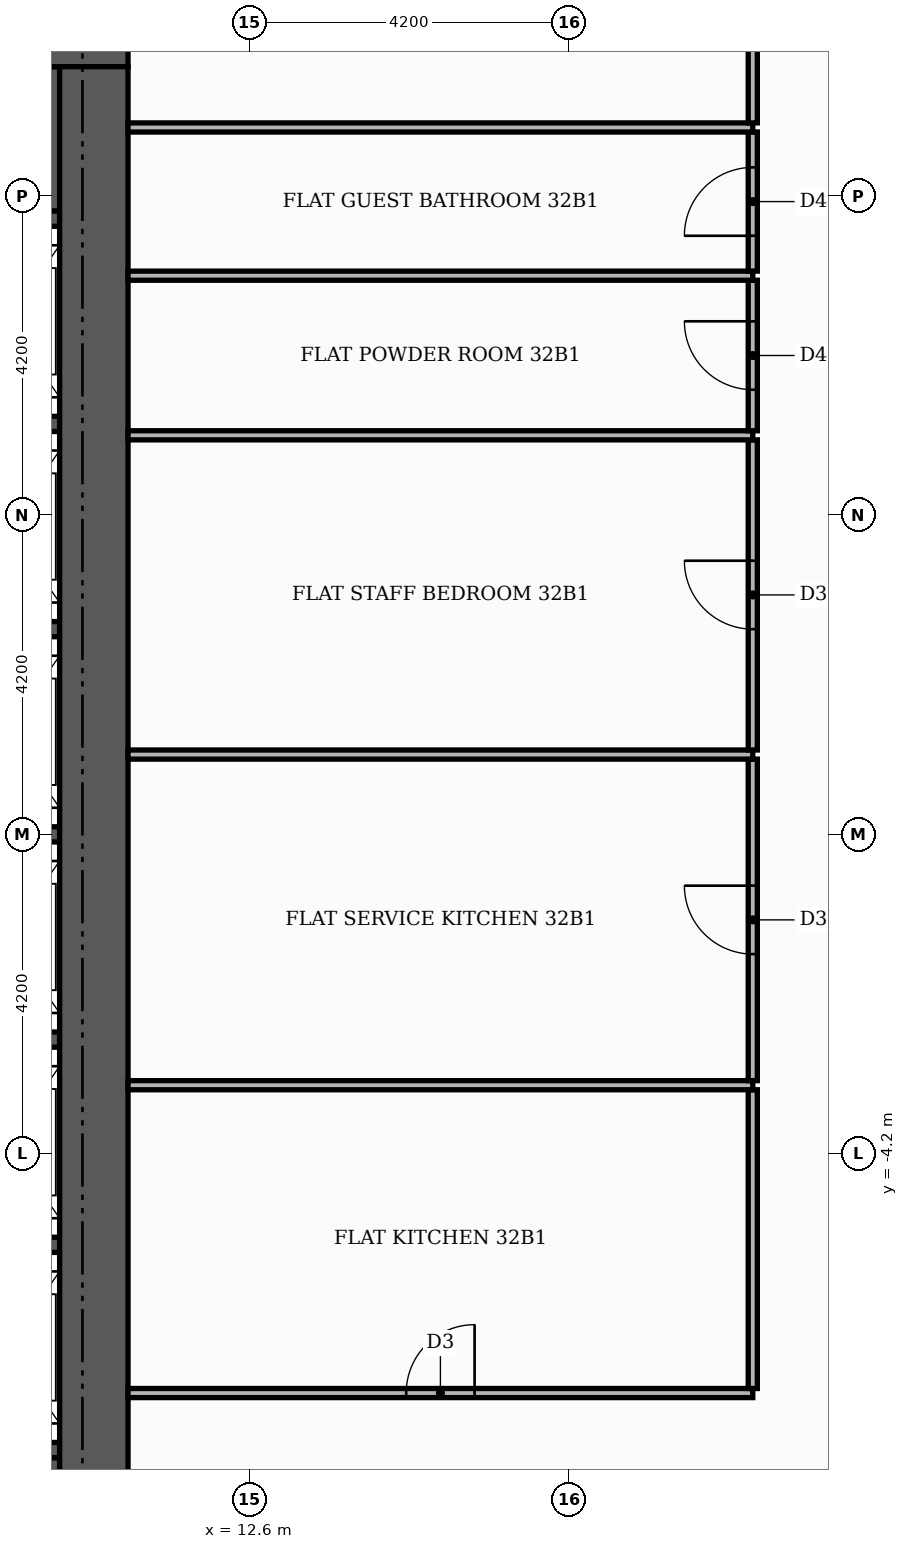
"""IFC4 building model, lengths in metres.
Left out: names, types, materials, properties, quantities, classifications, styles, units other than length and angle.
Written with IfcOpenShell. Run it as: python <this file> out.ifc"""

import sys

from ifc_helpers import new_model, si_unit, direction, frame, frame_2d, origin, place, context, subcontext, project, spatial, rectangle, extrude, element, fill, save


model = new_model("IFC4")
c1 = context("Model", 3, precision=1e-05, world=origin(), true_north=direction((0.0, 1.0)))
c2 = subcontext(c1, "Body", "Model", "MODEL_VIEW")
j1 = project(units=[si_unit("LENGTHUNIT", "METRE"), si_unit("PLANEANGLEUNIT", "RADIAN")], contexts=[c1])
p1 = place(None, origin())
s1 = spatial("IfcSite", under=j1, at=p1, CompositionType="ELEMENT")
p2 = place(p1, origin())
s2 = spatial("IfcBuilding", under=s1, at=p2, CompositionType="ELEMENT")
p3 = place(p2, frame((0.0, 0.0, 137.7)))
s3 = spatial("IfcBuildingStorey", under=s2, at=p3, CompositionType="ELEMENT", Elevation=137.7)
for number, where, z_axis, x_axis in (
    (1, (5.5, -9.15, 0.0), (0.0, 0.0, 1.0), (1.0, 0.0, 0.0)),
    (2, (5.5, 9.15, 0.0), (0.0, 0.0, 1.0), (1.0, 0.0, 0.0)),
):
    element("IfcWall", number, at=place(p3, frame(where, z_axis=z_axis, x_axis=x_axis)), inside=s3, PredefinedType="SHEAR", context=c2, shape_type="SweptSolid", body=[
        extrude(rectangle(XDim=4.6, YDim=1.9, at=frame_2d((2.3, 0.0))), origin(), (0.0, 0.0, 1.0), 3.48),
    ])
for number, where, z_axis, x_axis in (
    (3, (8.1, -8.1, 0.0), (0.0, 0.0, 1.0), (1.0, 0.0, 0.0)),
    (4, (8.1, -5.4, 0.0), (0.0, 0.0, 1.0), (1.0, 0.0, 0.0)),
    (5, (8.1, -2.7, 0.0), (0.0, 0.0, 1.0), (1.0, 0.0, 0.0)),
    (6, (8.1, 0.0, 0.0), (0.0, 0.0, 1.0), (1.0, 0.0, 0.0)),
    (7, (8.1, 2.7, 0.0), (0.0, 0.0, 1.0), (1.0, 0.0, 0.0)),
    (8, (8.1, 5.4, 0.0), (0.0, 0.0, 1.0), (1.0, 0.0, 0.0)),
    (9, (8.1, 8.1, 0.0), (0.0, 0.0, 1.0), (1.0, 0.0, 0.0)),
):
    element("IfcWall", number, at=place(p3, frame(where, z_axis=z_axis, x_axis=x_axis)), inside=s3, PredefinedType="SHEAR", context=c2, shape_type="SweptSolid", body=[
        extrude(rectangle(XDim=2.0, YDim=0.2, at=frame_2d((1.0, 0.0))), origin(), (0.0, 0.0, 1.0), 3.48),
    ])
p4 = place(p3, frame((-11.0, 10.55, 0.0), z_axis=(0.0, 0.0, 1.0), x_axis=(1.0, 0.0, 0.0)))
e10 = element("IfcWall", 10, at=p4, inside=s3, PredefinedType="SHEAR", context=c2, shape_type="SweptSolid", body=[
    extrude(rectangle(XDim=22.0, YDim=0.9, at=frame_2d((11.0, 0.0))), origin(), (0.0, 0.0, 1.0), 3.48),
])
p5 = place(p4, frame((13.3, 0.0, 0.0)))
e11 = element("IfcOpeningElement", 11, at=p5, cuts=e10, PredefinedType="OPENING", context=c2, shape_type="SweptSolid", body=[
    extrude(rectangle(XDim=1.8, YDim=2.2, at=frame_2d((0.9, 1.1))), frame((0.0, 0.46, 0.0), z_axis=(0.0, -1.0, 0.0), x_axis=(1.0, 0.0, 0.0)), (0.0, 0.0, 1.0), 0.92),
])
p6 = place(p3, frame((10.55, -10.1, 0.0), z_axis=(0.0, 0.0, 1.0), x_axis=(0.0, 1.0, 0.0)))
e12 = element("IfcWall", 12, at=p6, inside=s3, PredefinedType="SHEAR", context=c2, shape_type="SweptSolid", body=[
    extrude(rectangle(XDim=20.2, YDim=0.9, at=frame_2d((10.1, 0.0))), origin(), (0.0, 0.0, 1.0), 3.48),
])
p7 = place(p3, frame((11.0, -7.35, 0.0), z_axis=(0.0, 0.0, 1.0), x_axis=(1.0, 0.0, 0.0)))
e13 = element("IfcWall", 13, at=p7, inside=s3, PredefinedType="PARTITIONING", context=c2, shape_type="SweptSolid", body=[
    extrude(rectangle(XDim=8.22, YDim=0.12, at=frame_2d((4.11, 0.0))), origin(), (0.0, 0.0, 1.0), 3.48),
])
p8 = place(p7, frame((3.66, 0.0, 0.0)))
e14 = element("IfcOpeningElement", 14, at=p8, cuts=e13, PredefinedType="OPENING", context=c2, shape_type="SweptSolid", body=[
    extrude(rectangle(XDim=0.9, YDim=2.1, at=frame_2d((0.45, 1.05))), frame((0.0, 0.07, 0.0), z_axis=(0.0, -1.0, 0.0), x_axis=(1.0, 0.0, 0.0)), (0.0, 0.0, 1.0), 0.14),
])
p9 = place(p3, frame((19.22, -7.29, 0.0), z_axis=(0.0, 0.0, 1.0), x_axis=(0.0, 1.0, 0.0)))
e15 = element("IfcWall", 15, at=p9, inside=s3, PredefinedType="PARTITIONING", context=c2, shape_type="SweptSolid", body=[
    extrude(rectangle(XDim=3.93, YDim=0.12, at=frame_2d((1.965, 0.0))), origin(), (0.0, 0.0, 1.0), 3.48),
])
p10 = place(p3, frame((11.0, -3.3, 0.0), z_axis=(0.0, 0.0, 1.0), x_axis=(1.0, 0.0, 0.0)))
e16 = element("IfcWall", 16, at=p10, inside=s3, PredefinedType="PARTITIONING", context=c2, shape_type="SweptSolid", body=[
    extrude(rectangle(XDim=8.22, YDim=0.12, at=frame_2d((4.11, 0.0))), origin(), (0.0, 0.0, 1.0), 3.48),
])
p11 = place(p3, frame((19.22, -3.24, 0.0), z_axis=(0.0, 0.0, 1.0), x_axis=(0.0, 1.0, 0.0)))
e17 = element("IfcWall", 17, at=p11, inside=s3, PredefinedType="PARTITIONING", context=c2, shape_type="SweptSolid", body=[
    extrude(rectangle(XDim=4.23, YDim=0.12, at=frame_2d((2.115, 0.0))), origin(), (0.0, 0.0, 1.0), 3.48),
])
p12 = place(p11, frame((1.665, 0.0, 0.0)))
e18 = element("IfcOpeningElement", 18, at=p12, cuts=e17, PredefinedType="OPENING", context=c2, shape_type="SweptSolid", body=[
    extrude(rectangle(XDim=0.9, YDim=2.1, at=frame_2d((0.45, 1.05))), frame((0.0, 0.07, 0.0), z_axis=(0.0, -1.0, 0.0), x_axis=(1.0, 0.0, 0.0)), (0.0, 0.0, 1.0), 0.14),
])
p13 = place(p3, frame((11.0, 1.05, 0.0), z_axis=(0.0, 0.0, 1.0), x_axis=(1.0, 0.0, 0.0)))
e19 = element("IfcWall", 19, at=p13, inside=s3, PredefinedType="PARTITIONING", context=c2, shape_type="SweptSolid", body=[
    extrude(rectangle(XDim=8.22, YDim=0.12, at=frame_2d((4.11, 0.0))), origin(), (0.0, 0.0, 1.0), 3.48),
])
p14 = place(p3, frame((19.22, 1.11, 0.0), z_axis=(0.0, 0.0, 1.0), x_axis=(0.0, 1.0, 0.0)))
e20 = element("IfcWall", 20, at=p14, inside=s3, PredefinedType="PARTITIONING", context=c2, shape_type="SweptSolid", body=[
    extrude(rectangle(XDim=4.08, YDim=0.12, at=frame_2d((2.04, 0.0))), origin(), (0.0, 0.0, 1.0), 3.48),
])
p15 = place(p14, frame((1.59, 0.0, 0.0)))
e21 = element("IfcOpeningElement", 21, at=p15, cuts=e20, PredefinedType="OPENING", context=c2, shape_type="SweptSolid", body=[
    extrude(rectangle(XDim=0.9, YDim=2.1, at=frame_2d((0.45, 1.05))), frame((0.0, 0.07, 0.0), z_axis=(0.0, -1.0, 0.0), x_axis=(1.0, 0.0, 0.0)), (0.0, 0.0, 1.0), 0.14),
])
p16 = place(p3, frame((11.0, 5.25, 0.0), z_axis=(0.0, 0.0, 1.0), x_axis=(1.0, 0.0, 0.0)))
e22 = element("IfcWall", 22, at=p16, inside=s3, PredefinedType="PARTITIONING", context=c2, shape_type="SweptSolid", body=[
    extrude(rectangle(XDim=8.22, YDim=0.12, at=frame_2d((4.11, 0.0))), origin(), (0.0, 0.0, 1.0), 3.48),
])
p17 = place(p3, frame((19.22, 5.31, 0.0), z_axis=(0.0, 0.0, 1.0), x_axis=(0.0, 1.0, 0.0)))
e23 = element("IfcWall", 23, at=p17, inside=s3, PredefinedType="PARTITIONING", context=c2, shape_type="SweptSolid", body=[
    extrude(rectangle(XDim=1.98, YDim=0.12, at=frame_2d((0.99, 0.0))), origin(), (0.0, 0.0, 1.0), 3.48),
])
p18 = place(p17, frame((0.54, 0.0, 0.0)))
e24 = element("IfcOpeningElement", 24, at=p18, cuts=e23, PredefinedType="OPENING", context=c2, shape_type="SweptSolid", body=[
    extrude(rectangle(XDim=0.9, YDim=2.1, at=frame_2d((0.45, 1.05))), frame((0.0, 0.07, 0.0), z_axis=(0.0, -1.0, 0.0), x_axis=(1.0, 0.0, 0.0)), (0.0, 0.0, 1.0), 0.14),
])
p19 = place(p3, frame((11.0, 7.35, 0.0), z_axis=(0.0, 0.0, 1.0), x_axis=(1.0, 0.0, 0.0)))
e25 = element("IfcWall", 25, at=p19, inside=s3, PredefinedType="PARTITIONING", context=c2, shape_type="SweptSolid", body=[
    extrude(rectangle(XDim=8.22, YDim=0.12, at=frame_2d((4.11, 0.0))), origin(), (0.0, 0.0, 1.0), 3.48),
])
p20 = place(p3, frame((19.22, 7.41, 0.0), z_axis=(0.0, 0.0, 1.0), x_axis=(0.0, 1.0, 0.0)))
e26 = element("IfcWall", 26, at=p20, inside=s3, PredefinedType="PARTITIONING", context=c2, shape_type="SweptSolid", body=[
    extrude(rectangle(XDim=1.83, YDim=0.12, at=frame_2d((0.915, 0.0))), origin(), (0.0, 0.0, 1.0), 3.48),
])
p21 = place(p20, frame((0.465, 0.0, 0.0)))
e27 = element("IfcOpeningElement", 27, at=p21, cuts=e26, PredefinedType="OPENING", context=c2, shape_type="SweptSolid", body=[
    extrude(rectangle(XDim=0.9, YDim=2.1, at=frame_2d((0.45, 1.05))), frame((0.0, 0.07, 0.0), z_axis=(0.0, -1.0, 0.0), x_axis=(1.0, 0.0, 0.0)), (0.0, 0.0, 1.0), 0.14),
])
p22 = place(p3, frame((11.0, 9.3, 0.0), z_axis=(0.0, 0.0, 1.0), x_axis=(1.0, 0.0, 0.0)))
e28 = element("IfcWall", 28, at=p22, inside=s3, PredefinedType="PARTITIONING", context=c2, shape_type="SweptSolid", body=[
    extrude(rectangle(XDim=8.22, YDim=0.12, at=frame_2d((4.11, 0.0))), origin(), (0.0, 0.0, 1.0), 3.48),
])
p23 = place(p3, frame((19.22, 9.36, 0.0), z_axis=(0.0, 0.0, 1.0), x_axis=(0.0, 1.0, 0.0)))
e29 = element("IfcWall", 29, at=p23, inside=s3, PredefinedType="PARTITIONING", context=c2, shape_type="SweptSolid", body=[
    extrude(rectangle(XDim=4.19, YDim=0.12, at=frame_2d((2.095, 0.0))), origin(), (0.0, 0.0, 1.0), 3.48),
])
p24 = place(p23, frame((1.665, 0.0, 0.0)))
e30 = element("IfcOpeningElement", 30, at=p24, cuts=e29, PredefinedType="OPENING", context=c2, shape_type="SweptSolid", body=[
    extrude(rectangle(XDim=0.9, YDim=2.1, at=frame_2d((0.45, 1.05))), frame((0.0, 0.07, 0.0), z_axis=(0.0, -1.0, 0.0), x_axis=(1.0, 0.0, 0.0)), (0.0, 0.0, 1.0), 0.14),
])
p25 = place(p8, origin())
e31 = element("IfcDoor", 31, at=p25, inside=s3, OperationType="SINGLE_SWING_RIGHT", PredefinedType="DOOR", context=c2, shape_type="SweptSolid", body=[
    extrude(rectangle(XDim=0.9, YDim=2.1, at=frame_2d((0.45, 1.05))), frame((0.0, 0.025, 0.0), z_axis=(0.0, -1.0, 0.0), x_axis=(1.0, 0.0, 0.0)), (0.0, 0.0, 1.0), 0.05),
])
fill(e14, e31)
p26 = place(p12, origin())
e32 = element("IfcDoor", 32, at=p26, inside=s3, OperationType="SINGLE_SWING_RIGHT", PredefinedType="DOOR", context=c2, shape_type="SweptSolid", body=[
    extrude(rectangle(XDim=0.9, YDim=2.1, at=frame_2d((0.45, 1.05))), frame((0.0, 0.025, 0.0), z_axis=(0.0, -1.0, 0.0), x_axis=(1.0, 0.0, 0.0)), (0.0, 0.0, 1.0), 0.05),
])
fill(e18, e32)
p27 = place(p15, origin())
e33 = element("IfcDoor", 33, at=p27, inside=s3, OperationType="SINGLE_SWING_RIGHT", PredefinedType="DOOR", context=c2, shape_type="SweptSolid", body=[
    extrude(rectangle(XDim=0.9, YDim=2.1, at=frame_2d((0.45, 1.05))), frame((0.0, 0.025, 0.0), z_axis=(0.0, -1.0, 0.0), x_axis=(1.0, 0.0, 0.0)), (0.0, 0.0, 1.0), 0.05),
])
fill(e21, e33)
p28 = place(p18, origin())
e34 = element("IfcDoor", 34, at=p28, inside=s3, OperationType="SINGLE_SWING_RIGHT", PredefinedType="DOOR", context=c2, shape_type="SweptSolid", body=[
    extrude(rectangle(XDim=0.9, YDim=2.1, at=frame_2d((0.45, 1.05))), frame((0.0, 0.025, 0.0), z_axis=(0.0, -1.0, 0.0), x_axis=(1.0, 0.0, 0.0)), (0.0, 0.0, 1.0), 0.05),
])
fill(e24, e34)
p29 = place(p21, origin())
e35 = element("IfcDoor", 35, at=p29, inside=s3, OperationType="SINGLE_SWING_LEFT", PredefinedType="DOOR", context=c2, shape_type="SweptSolid", body=[
    extrude(rectangle(XDim=0.9, YDim=2.1, at=frame_2d((0.45, 1.05))), frame((0.0, 0.025, 0.0), z_axis=(0.0, -1.0, 0.0), x_axis=(1.0, 0.0, 0.0)), (0.0, 0.0, 1.0), 0.05),
])
fill(e27, e35)
save(model, sys.argv[1])
